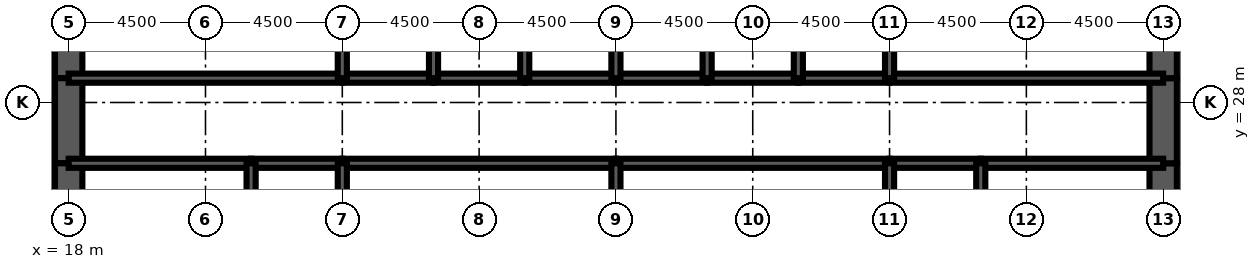
"""IFC4 building model, lengths in metres.
Left out: names, types, materials, properties, quantities, classifications, styles, units other than length and angle.
Written with IfcOpenShell. Run it as: python <this file> out.ifc"""

import sys

from ifc_helpers import new_model, si_unit, direction, frame, frame_2d, origin, place, context, subcontext, project, spatial, rectangle, extrude, element, fill, save


model = new_model("IFC4")
c1 = context("Model", 3, precision=1e-05, world=origin(), true_north=direction((0.0, 1.0)))
c2 = subcontext(c1, "Body", "Model", "MODEL_VIEW")
j1 = project(units=[si_unit("LENGTHUNIT", "METRE"), si_unit("PLANEANGLEUNIT", "RADIAN")], contexts=[c1])
p1 = place(None, origin())
s1 = spatial("IfcSite", under=j1, at=p1, CompositionType="ELEMENT")
p2 = place(p1, origin())
s2 = spatial("IfcBuilding", under=s1, at=p2, CompositionType="ELEMENT")
p3 = place(p2, frame((0.0, 0.0, 13.0)))
s3 = spatial("IfcBuildingStorey", under=s2, at=p3, CompositionType="ELEMENT", Elevation=13.0)
p4 = place(p3, frame((18.0, 32.0, 0.0), z_axis=(0.0, 0.0, 1.0), x_axis=(0.0, -1.0, 0.0)))
e1 = element("IfcWall", 1, at=p4, inside=s3, PredefinedType="SHEAR", context=c2, shape_type="SweptSolid", body=[
    extrude(rectangle(XDim=3.2, YDim=0.9, at=frame_2d((1.6, 0.0))), origin(), (0.0, 0.0, 1.0), 5.0),
])
p5 = place(p3, frame((18.0, 28.8, 0.0), z_axis=(0.0, 0.0, 1.0), x_axis=(0.0, -1.0, 0.0)))
e2 = element("IfcWall", 2, at=p5, inside=s3, PredefinedType="SHEAR", context=c2, shape_type="SweptSolid", body=[
    extrude(rectangle(XDim=2.8, YDim=0.9, at=frame_2d((1.4, 0.0))), origin(), (0.0, 0.0, 1.0), 5.0),
])
p6 = place(p5, frame((0.4, 0.0, 0.0)))
e3 = element("IfcOpeningElement", 3, at=p6, cuts=e2, PredefinedType="OPENING", context=c2, shape_type="SweptSolid", body=[
    extrude(rectangle(XDim=1.8, YDim=2.1, at=frame_2d((0.9, 1.05))), frame((0.0, 0.46, 0.0), z_axis=(0.0, -1.0, 0.0), x_axis=(1.0, 0.0, 0.0)), (0.0, 0.0, 1.0), 0.92),
])
for number, where, z_axis, x_axis in (
    (4, (18.0, 26.0, 0.0), (0.0, 0.0, 1.0), (0.0, -1.0, 0.0)),
    (5, (54.0, 22.0, 0.0), (0.0, 0.0, 1.0), (0.0, 1.0, 0.0)),
):
    element("IfcWall", number, at=place(p3, frame(where, z_axis=z_axis, x_axis=x_axis)), inside=s3, PredefinedType="SHEAR", context=c2, shape_type="SweptSolid", body=[
        extrude(rectangle(XDim=4.0, YDim=0.9, at=frame_2d((2.0, 0.0))), origin(), (0.0, 0.0, 1.0), 5.0),
    ])
p7 = place(p3, frame((54.0, 26.0, 0.0), z_axis=(0.0, 0.0, 1.0), x_axis=(0.0, 1.0, 0.0)))
e6 = element("IfcWall", 6, at=p7, inside=s3, PredefinedType="SHEAR", context=c2, shape_type="SweptSolid", body=[
    extrude(rectangle(XDim=2.8, YDim=0.9, at=frame_2d((1.4, 0.0))), origin(), (0.0, 0.0, 1.0), 5.0),
])
p8 = place(p7, frame((0.6, 0.0, 0.0)))
e7 = element("IfcOpeningElement", 7, at=p8, cuts=e6, PredefinedType="OPENING", context=c2, shape_type="SweptSolid", body=[
    extrude(rectangle(XDim=1.8, YDim=2.1, at=frame_2d((0.9, 1.05))), frame((0.0, 0.46, 0.0), z_axis=(0.0, -1.0, 0.0), x_axis=(1.0, 0.0, 0.0)), (0.0, 0.0, 1.0), 0.92),
])
p9 = place(p3, frame((54.0, 28.8, 0.0), z_axis=(0.0, 0.0, 1.0), x_axis=(0.0, 1.0, 0.0)))
e8 = element("IfcWall", 8, at=p9, inside=s3, PredefinedType="SHEAR", context=c2, shape_type="SweptSolid", body=[
    extrude(rectangle(XDim=3.2, YDim=0.9, at=frame_2d((1.6, 0.0))), origin(), (0.0, 0.0, 1.0), 5.0),
])
p10 = place(p3, frame((18.0, 28.8, 0.0), z_axis=(0.0, 0.0, 1.0), x_axis=(1.0, 0.0, 0.0)))
e9 = element("IfcWall", 9, at=p10, inside=s3, PredefinedType="SOLIDWALL", context=c2, shape_type="SweptSolid", body=[
    extrude(rectangle(XDim=9.0, YDim=0.3, at=frame_2d((4.5, 0.0))), origin(), (0.0, 0.0, 1.0), 5.0),
])
p11 = place(p10, frame((0.65, 0.0, 0.0)))
e10 = element("IfcOpeningElement", 10, at=p11, cuts=e9, PredefinedType="OPENING", context=c2, shape_type="SweptSolid", body=[
    extrude(rectangle(XDim=1.0, YDim=2.1, at=frame_2d((0.5, 1.05))), frame((0.0, 0.16, 0.0), z_axis=(0.0, -1.0, 0.0), x_axis=(1.0, 0.0, 0.0)), (0.0, 0.0, 1.0), 0.32),
])
p12 = place(p3, frame((27.0, 28.8, 0.0), z_axis=(0.0, 0.0, 1.0), x_axis=(1.0, 0.0, 0.0)))
e11 = element("IfcWall", 11, at=p12, inside=s3, PredefinedType="SOLIDWALL", context=c2, shape_type="SweptSolid", body=[
    extrude(rectangle(XDim=3.0, YDim=0.3, at=frame_2d((1.5, 0.0))), origin(), (0.0, 0.0, 1.0), 5.0),
])
p13 = place(p12, frame((0.95, 0.0, 0.0)))
e12 = element("IfcOpeningElement", 12, at=p13, cuts=e11, PredefinedType="OPENING", context=c2, shape_type="SweptSolid", body=[
    extrude(rectangle(XDim=1.1, YDim=2.2, at=frame_2d((0.55, 1.1))), frame((0.0, 0.16, 0.0), z_axis=(0.0, -1.0, 0.0), x_axis=(1.0, 0.0, 0.0)), (0.0, 0.0, 1.0), 0.32),
])
p14 = place(p3, frame((30.0, 28.8, 0.0), z_axis=(0.0, 0.0, 1.0), x_axis=(1.0, 0.0, 0.0)))
e13 = element("IfcWall", 13, at=p14, inside=s3, PredefinedType="SOLIDWALL", context=c2, shape_type="SweptSolid", body=[
    extrude(rectangle(XDim=3.0, YDim=0.3, at=frame_2d((1.5, 0.0))), origin(), (0.0, 0.0, 1.0), 5.0),
])
p15 = place(p14, frame((0.95, 0.0, 0.0)))
e14 = element("IfcOpeningElement", 14, at=p15, cuts=e13, PredefinedType="OPENING", context=c2, shape_type="SweptSolid", body=[
    extrude(rectangle(XDim=1.1, YDim=2.2, at=frame_2d((0.55, 1.1))), frame((0.0, 0.16, 0.0), z_axis=(0.0, -1.0, 0.0), x_axis=(1.0, 0.0, 0.0)), (0.0, 0.0, 1.0), 0.32),
])
p16 = place(p3, frame((33.0, 28.8, 0.0), z_axis=(0.0, 0.0, 1.0), x_axis=(1.0, 0.0, 0.0)))
e15 = element("IfcWall", 15, at=p16, inside=s3, PredefinedType="SOLIDWALL", context=c2, shape_type="SweptSolid", body=[
    extrude(rectangle(XDim=3.0, YDim=0.3, at=frame_2d((1.5, 0.0))), origin(), (0.0, 0.0, 1.0), 5.0),
])
p17 = place(p16, frame((0.95, 0.0, 0.0)))
e16 = element("IfcOpeningElement", 16, at=p17, cuts=e15, PredefinedType="OPENING", context=c2, shape_type="SweptSolid", body=[
    extrude(rectangle(XDim=1.1, YDim=2.2, at=frame_2d((0.55, 1.1))), frame((0.0, 0.16, 0.0), z_axis=(0.0, -1.0, 0.0), x_axis=(1.0, 0.0, 0.0)), (0.0, 0.0, 1.0), 0.32),
])
for number, where, z_axis, x_axis in (
    (17, (36.0, 28.8, 0.0), (0.0, 0.0, 1.0), (1.0, 0.0, 0.0)),
    (18, (39.0, 28.8, 0.0), (0.0, 0.0, 1.0), (1.0, 0.0, 0.0)),
):
    element("IfcWall", number, at=place(p3, frame(where, z_axis=z_axis, x_axis=x_axis)), inside=s3, PredefinedType="SOLIDWALL", context=c2, shape_type="SweptSolid", body=[
        extrude(rectangle(XDim=3.0, YDim=0.3, at=frame_2d((1.5, 0.0))), origin(), (0.0, 0.0, 1.0), 5.0),
    ])
p18 = place(p3, frame((42.0, 28.8, 0.0), z_axis=(0.0, 0.0, 1.0), x_axis=(1.0, 0.0, 0.0)))
e19 = element("IfcWall", 19, at=p18, inside=s3, PredefinedType="SOLIDWALL", context=c2, shape_type="SweptSolid", body=[
    extrude(rectangle(XDim=3.0, YDim=0.3, at=frame_2d((1.5, 0.0))), origin(), (0.0, 0.0, 1.0), 5.0),
])
p19 = place(p18, frame((0.95, 0.0, 0.0)))
e20 = element("IfcOpeningElement", 20, at=p19, cuts=e19, PredefinedType="OPENING", context=c2, shape_type="SweptSolid", body=[
    extrude(rectangle(XDim=1.1, YDim=2.2, at=frame_2d((0.55, 1.1))), frame((0.0, 0.16, 0.0), z_axis=(0.0, -1.0, 0.0), x_axis=(1.0, 0.0, 0.0)), (0.0, 0.0, 1.0), 0.32),
])
p20 = place(p3, frame((45.0, 28.8, 0.0), z_axis=(0.0, 0.0, 1.0), x_axis=(1.0, 0.0, 0.0)))
e21 = element("IfcWall", 21, at=p20, inside=s3, PredefinedType="SOLIDWALL", context=c2, shape_type="SweptSolid", body=[
    extrude(rectangle(XDim=9.0, YDim=0.3, at=frame_2d((4.5, 0.0))), origin(), (0.0, 0.0, 1.0), 5.0),
])
p21 = place(p20, frame((7.35, 0.0, 0.0)))
e22 = element("IfcOpeningElement", 22, at=p21, cuts=e21, PredefinedType="OPENING", context=c2, shape_type="SweptSolid", body=[
    extrude(rectangle(XDim=1.0, YDim=2.1, at=frame_2d((0.5, 1.05))), frame((0.0, 0.16, 0.0), z_axis=(0.0, -1.0, 0.0), x_axis=(1.0, 0.0, 0.0)), (0.0, 0.0, 1.0), 0.32),
])
p22 = place(p3, frame((18.0, 26.0, 0.0), z_axis=(0.0, 0.0, 1.0), x_axis=(1.0, 0.0, 0.0)))
e23 = element("IfcWall", 23, at=p22, inside=s3, PredefinedType="SOLIDWALL", context=c2, shape_type="SweptSolid", body=[
    extrude(rectangle(XDim=6.0, YDim=0.3, at=frame_2d((3.0, 0.0))), origin(), (0.0, 0.0, 1.0), 5.0),
])
p23 = place(p3, frame((24.0, 26.0, 0.0), z_axis=(0.0, 0.0, 1.0), x_axis=(1.0, 0.0, 0.0)))
e24 = element("IfcWall", 24, at=p23, inside=s3, PredefinedType="SOLIDWALL", context=c2, shape_type="SweptSolid", body=[
    extrude(rectangle(XDim=3.0, YDim=0.3, at=frame_2d((1.5, 0.0))), origin(), (0.0, 0.0, 1.0), 5.0),
])
for number, where, z_axis, x_axis in (
    (25, (27.0, 26.0, 0.0), (0.0, 0.0, 1.0), (1.0, 0.0, 0.0)),
    (26, (36.0, 26.0, 0.0), (0.0, 0.0, 1.0), (1.0, 0.0, 0.0)),
):
    element("IfcWall", number, at=place(p3, frame(where, z_axis=z_axis, x_axis=x_axis)), inside=s3, PredefinedType="SOLIDWALL", context=c2, shape_type="SweptSolid", body=[
        extrude(rectangle(XDim=9.0, YDim=0.3, at=frame_2d((4.5, 0.0))), origin(), (0.0, 0.0, 1.0), 5.0),
    ])
p24 = place(p3, frame((45.0, 26.0, 0.0), z_axis=(0.0, 0.0, 1.0), x_axis=(1.0, 0.0, 0.0)))
e27 = element("IfcWall", 27, at=p24, inside=s3, PredefinedType="SOLIDWALL", context=c2, shape_type="SweptSolid", body=[
    extrude(rectangle(XDim=3.0, YDim=0.3, at=frame_2d((1.5, 0.0))), origin(), (0.0, 0.0, 1.0), 5.0),
])
p25 = place(p3, frame((48.0, 26.0, 0.0), z_axis=(0.0, 0.0, 1.0), x_axis=(1.0, 0.0, 0.0)))
e28 = element("IfcWall", 28, at=p25, inside=s3, PredefinedType="SOLIDWALL", context=c2, shape_type="SweptSolid", body=[
    extrude(rectangle(XDim=6.0, YDim=0.3, at=frame_2d((3.0, 0.0))), origin(), (0.0, 0.0, 1.0), 5.0),
])
for number, where, z_axis, x_axis in (
    (29, (27.0, 28.8, 0.0), (0.0, 0.0, 1.0), (0.0, 1.0, 0.0)),
    (30, (30.0, 28.8, 0.0), (0.0, 0.0, 1.0), (0.0, 1.0, 0.0)),
    (31, (33.0, 28.8, 0.0), (0.0, 0.0, 1.0), (0.0, 1.0, 0.0)),
    (32, (36.0, 28.8, 0.0), (0.0, 0.0, 1.0), (0.0, 1.0, 0.0)),
    (33, (39.0, 28.8, 0.0), (0.0, 0.0, 1.0), (0.0, 1.0, 0.0)),
    (34, (42.0, 28.8, 0.0), (0.0, 0.0, 1.0), (0.0, 1.0, 0.0)),
    (35, (45.0, 28.8, 0.0), (0.0, 0.0, 1.0), (0.0, 1.0, 0.0)),
):
    element("IfcWall", number, at=place(p3, frame(where, z_axis=z_axis, x_axis=x_axis)), inside=s3, PredefinedType="SOLIDWALL", context=c2, shape_type="SweptSolid", body=[
        extrude(rectangle(XDim=3.2, YDim=0.3, at=frame_2d((1.6, 0.0))), origin(), (0.0, 0.0, 1.0), 5.0),
    ])
for number, where, z_axis, x_axis in (
    (36, (24.0, 22.0, 0.0), (0.0, 0.0, 1.0), (0.0, 1.0, 0.0)),
    (37, (27.0, 22.0, 0.0), (0.0, 0.0, 1.0), (0.0, 1.0, 0.0)),
    (38, (36.0, 22.0, 0.0), (0.0, 0.0, 1.0), (0.0, 1.0, 0.0)),
    (39, (45.0, 22.0, 0.0), (0.0, 0.0, 1.0), (0.0, 1.0, 0.0)),
    (40, (48.0, 22.0, 0.0), (0.0, 0.0, 1.0), (0.0, 1.0, 0.0)),
):
    element("IfcWall", number, at=place(p3, frame(where, z_axis=z_axis, x_axis=x_axis)), inside=s3, PredefinedType="SOLIDWALL", context=c2, shape_type="SweptSolid", body=[
        extrude(rectangle(XDim=4.0, YDim=0.3, at=frame_2d((2.0, 0.0))), origin(), (0.0, 0.0, 1.0), 5.0),
    ])
p26 = place(p3, frame((42.0, 22.15, 0.0), z_axis=(0.0, 0.0, 1.0), x_axis=(0.0, 1.0, 0.0)))
e41 = element("IfcWall", 41, at=p26, inside=s3, PredefinedType="PARTITIONING", context=c2, shape_type="SweptSolid", body=[
    extrude(rectangle(XDim=3.7, YDim=0.15, at=frame_2d((1.85, 0.0))), origin(), (0.0, 0.0, 1.0), 3.0),
])
p27 = place(p26, frame((2.2, 0.0, 0.0)))
e42 = element("IfcOpeningElement", 42, at=p27, cuts=e41, PredefinedType="OPENING", context=c2, shape_type="SweptSolid", body=[
    extrude(rectangle(XDim=1.0, YDim=2.1, at=frame_2d((0.5, 1.05))), frame((0.0, 0.085, 0.0), z_axis=(0.0, -1.0, 0.0), x_axis=(1.0, 0.0, 0.0)), (0.0, 0.0, 1.0), 0.17),
])
for number, where, z_axis, x_axis in (
    (43, (20.325, 22.15, 0.0), (0.0, 0.0, 1.0), (0.0, 1.0, 0.0)),
    (44, (51.675, 22.15, 0.0), (0.0, 0.0, 1.0), (0.0, 1.0, 0.0)),
):
    element("IfcWall", number, at=place(p3, frame(where, z_axis=z_axis, x_axis=x_axis)), inside=s3, PredefinedType="PARTITIONING", context=c2, shape_type="SweptSolid", body=[
        extrude(rectangle(XDim=3.7, YDim=0.15, at=frame_2d((1.85, 0.0))), origin(), (0.0, 0.0, 1.0), 3.0),
    ])
p28 = place(p27, origin())
e45 = element("IfcDoor", 45, at=p28, inside=s3, OperationType="SINGLE_SWING_RIGHT", PredefinedType="DOOR", context=c2, shape_type="SweptSolid", body=[
    extrude(rectangle(XDim=1.0, YDim=2.1, at=frame_2d((0.5, 1.05))), frame((0.0, 0.025, 0.0), z_axis=(0.0, -1.0, 0.0), x_axis=(1.0, 0.0, 0.0)), (0.0, 0.0, 1.0), 0.05),
])
fill(e42, e45)
p29 = place(p19, origin())
e46 = element("IfcDoor", 46, at=p29, inside=s3, OperationType="DOUBLE_DOOR_SLIDING", PredefinedType="USERDEFINED", context=c2, shape_type="SweptSolid", body=[
    extrude(rectangle(XDim=1.1, YDim=2.2, at=frame_2d((0.55, 1.1))), frame((0.0, 0.025, 0.0), z_axis=(0.0, -1.0, 0.0), x_axis=(1.0, 0.0, 0.0)), (0.0, 0.0, 1.0), 0.05),
])
fill(e20, e46)
p30 = place(p13, origin())
e47 = element("IfcDoor", 47, at=p30, inside=s3, OperationType="DOUBLE_DOOR_SLIDING", PredefinedType="USERDEFINED", context=c2, shape_type="SweptSolid", body=[
    extrude(rectangle(XDim=1.1, YDim=2.2, at=frame_2d((0.55, 1.1))), frame((0.0, 0.025, 0.0), z_axis=(0.0, -1.0, 0.0), x_axis=(1.0, 0.0, 0.0)), (0.0, 0.0, 1.0), 0.05),
])
fill(e12, e47)
p31 = place(p15, origin())
e48 = element("IfcDoor", 48, at=p31, inside=s3, OperationType="DOUBLE_DOOR_SLIDING", PredefinedType="USERDEFINED", context=c2, shape_type="SweptSolid", body=[
    extrude(rectangle(XDim=1.1, YDim=2.2, at=frame_2d((0.55, 1.1))), frame((0.0, 0.025, 0.0), z_axis=(0.0, -1.0, 0.0), x_axis=(1.0, 0.0, 0.0)), (0.0, 0.0, 1.0), 0.05),
])
fill(e14, e48)
p32 = place(p17, origin())
e49 = element("IfcDoor", 49, at=p32, inside=s3, OperationType="DOUBLE_DOOR_SLIDING", PredefinedType="USERDEFINED", context=c2, shape_type="SweptSolid", body=[
    extrude(rectangle(XDim=1.1, YDim=2.2, at=frame_2d((0.55, 1.1))), frame((0.0, 0.025, 0.0), z_axis=(0.0, -1.0, 0.0), x_axis=(1.0, 0.0, 0.0)), (0.0, 0.0, 1.0), 0.05),
])
fill(e16, e49)
p33 = place(p11, origin())
e50 = element("IfcDoor", 50, at=p33, inside=s3, OperationType="SINGLE_SWING_LEFT", PredefinedType="DOOR", context=c2, shape_type="SweptSolid", body=[
    extrude(rectangle(XDim=1.0, YDim=2.1, at=frame_2d((0.5, 1.05))), frame((0.0, 0.025, 0.0), z_axis=(0.0, -1.0, 0.0), x_axis=(1.0, 0.0, 0.0)), (0.0, 0.0, 1.0), 0.05),
])
fill(e10, e50)
p34 = place(p21, origin())
e51 = element("IfcDoor", 51, at=p34, inside=s3, OperationType="SINGLE_SWING_RIGHT", PredefinedType="DOOR", context=c2, shape_type="SweptSolid", body=[
    extrude(rectangle(XDim=1.0, YDim=2.1, at=frame_2d((0.5, 1.05))), frame((0.0, 0.025, 0.0), z_axis=(0.0, -1.0, 0.0), x_axis=(1.0, 0.0, 0.0)), (0.0, 0.0, 1.0), 0.05),
])
fill(e22, e51)
p35 = place(p6, origin())
e52 = element("IfcDoor", 52, at=p35, inside=s3, OperationType="SINGLE_SWING_LEFT", PredefinedType="DOOR", context=c2, shape_type="SweptSolid", body=[
    extrude(rectangle(XDim=1.8, YDim=2.1, at=frame_2d((0.9, 1.05))), frame((0.0, 0.45, 0.0), z_axis=(0.0, -1.0, 0.0), x_axis=(1.0, 0.0, 0.0)), (0.0, 0.0, 1.0), 0.899),
])
fill(e3, e52)
p36 = place(p8, origin())
e53 = element("IfcDoor", 53, at=p36, inside=s3, OperationType="SINGLE_SWING_LEFT", PredefinedType="DOOR", context=c2, shape_type="SweptSolid", body=[
    extrude(rectangle(XDim=1.8, YDim=2.1, at=frame_2d((0.9, 1.05))), frame((0.0, 0.45, 0.0), z_axis=(0.0, -1.0, 0.0), x_axis=(1.0, 0.0, 0.0)), (0.0, 0.0, 1.0), 0.899),
])
fill(e7, e53)
save(model, sys.argv[1])
